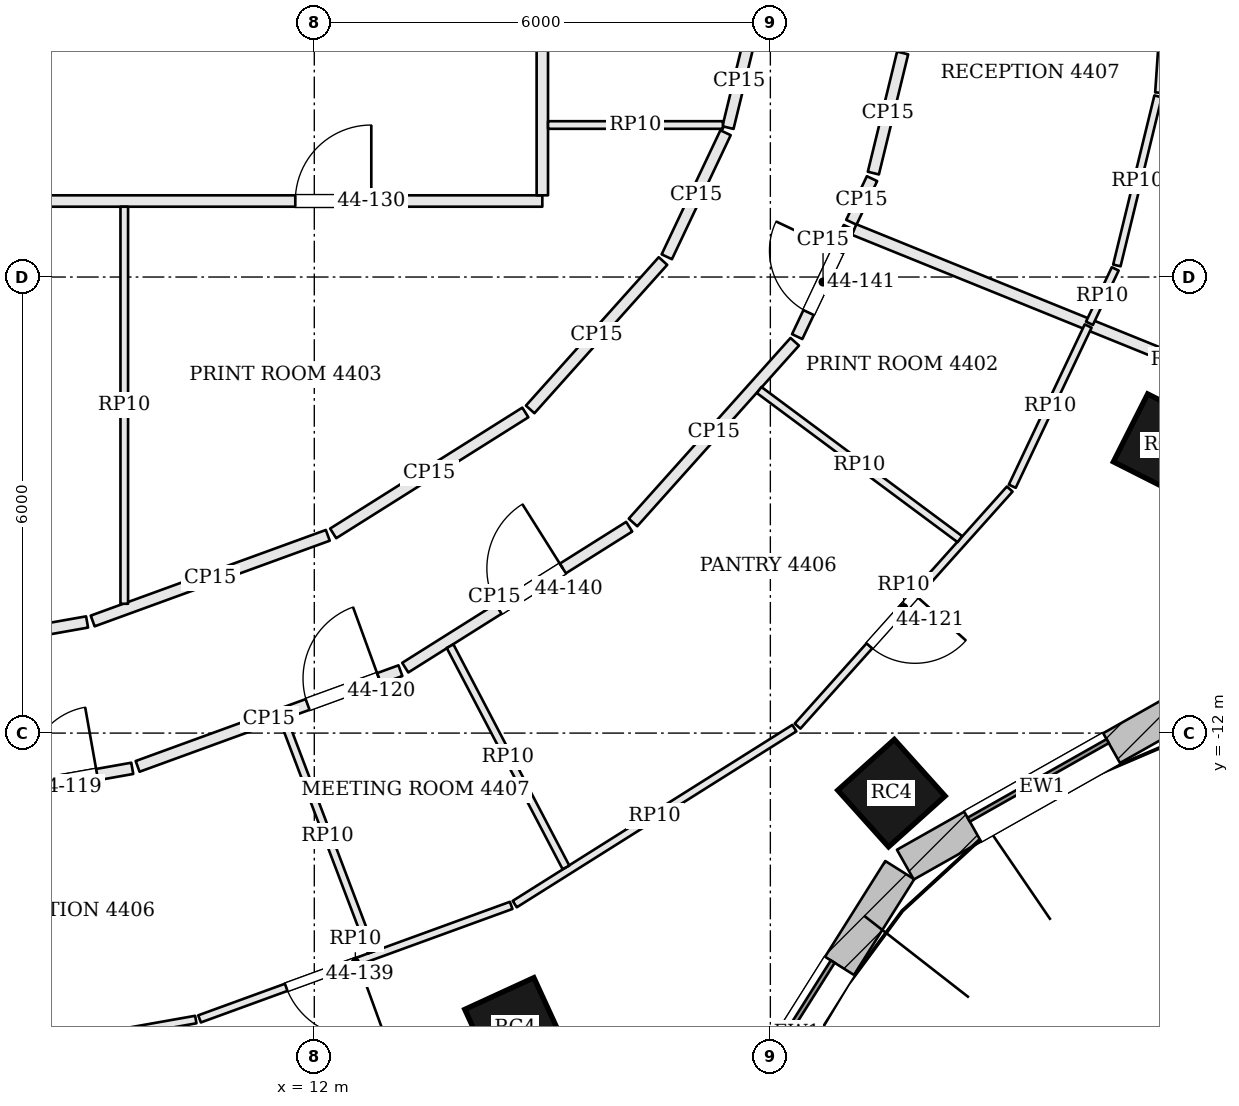
"""IFC4 building model, lengths in metres.
Left out: names, types, materials, properties, quantities, classifications, styles, units other than length and angle.
Written with IfcOpenShell. Run it as: python <this file> out.ifc"""

import sys

from ifc_helpers import new_model, si_unit, direction, frame, frame_2d, origin, origin_2d, place, context, subcontext, project, spatial, rectangle, extrude, element, fill, save


model = new_model("IFC4")
c1 = context("Model", 3, precision=1e-05, world=origin(), true_north=direction((0.0, 1.0)))
c2 = subcontext(c1, "Body", "Model", "MODEL_VIEW")
j1 = project(units=[si_unit("LENGTHUNIT", "METRE"), si_unit("PLANEANGLEUNIT", "RADIAN")], contexts=[c1])
p1 = place(None, origin())
s1 = spatial("IfcSite", under=j1, at=p1, CompositionType="ELEMENT")
p2 = place(p1, origin())
s2 = spatial("IfcBuilding", under=s1, at=p2, CompositionType="ELEMENT")
p3 = place(p2, frame((0.0, 0.0, 181.8)))
s3 = spatial("IfcBuildingStorey", under=s2, at=p3, CompositionType="ELEMENT", Elevation=181.8)
for number, where, z_axis, x_axis in (
    (1, (14.643, -15.881, 0.0), (0.0, 0.0, 1.0), (0.909, 0.417, 0.0)),
    (2, (19.593, -12.79, 0.0), (0.0, 0.0, 1.0), (0.744, 0.668, 0.0)),
    (3, (23.185, -8.21, 0.0), (0.0, 0.0, 1.0), (0.451, 0.893, 0.0)),
):
    element("IfcColumn", number, at=place(p3, frame(where, z_axis=z_axis, x_axis=x_axis)), inside=s3, PredefinedType="COLUMN", context=c2, shape_type="SweptSolid", body=[
        extrude(rectangle(XDim=1.0, YDim=1.0, at=origin_2d()), origin(), (0.0, 0.0, 1.0), 3.9),
    ])
p4 = place(p3, frame((16.998, -18.099, 0.0), z_axis=(0.0, 0.0, 1.0), x_axis=(0.532745661304, 0.846275404559, 0.0)))
e4 = element("IfcWall", 4, at=p4, inside=s3, PredefinedType="SOLIDWALL", context=c2, shape_type="SweptSolid", body=[
    extrude(rectangle(XDim=5.076, YDim=0.45, at=frame_2d((2.538, 0.0))), origin(), (0.0, 0.0, 1.0), 3.7),
])
p5 = place(p4, frame((1.488, 0.0, 0.9)))
e5 = element("IfcOpeningElement", 5, at=p5, cuts=e4, PredefinedType="OPENING", context=c2, shape_type="SweptSolid", body=[
    extrude(rectangle(XDim=2.1, YDim=2.3, at=frame_2d((1.05, 1.15))), frame((0.0, 0.235, 0.0), z_axis=(0.0, -1.0, 0.0), x_axis=(1.0, 0.0, 0.0)), (0.0, 0.0, 1.0), 0.47),
])
p6 = place(p3, frame((19.776, -13.731, 0.0), z_axis=(0.0, 0.0, 1.0), x_axis=(0.870610133829, 0.491973571318, 0.0)))
e6 = element("IfcWall", 6, at=p6, inside=s3, PredefinedType="SOLIDWALL", context=c2, shape_type="SweptSolid", body=[
    extrude(rectangle(XDim=4.134, YDim=0.45, at=frame_2d((2.067, 0.0))), origin(), (0.0, 0.0, 1.0), 3.7),
])
p7 = place(p6, frame((1.017, 0.0, 0.9)))
e7 = element("IfcOpeningElement", 7, at=p7, cuts=e6, PredefinedType="OPENING", context=c2, shape_type="SweptSolid", body=[
    extrude(rectangle(XDim=2.1, YDim=2.3, at=frame_2d((1.05, 1.15))), frame((0.0, 0.235, 0.0), z_axis=(0.0, -1.0, 0.0), x_axis=(1.0, 0.0, 0.0)), (0.0, 0.0, 1.0), 0.47),
])
p8 = place(p3, frame((5.992, -13.104, 0.0), z_axis=(0.0, 0.0, 1.0), x_axis=(0.98463249319, 0.174639209096, 0.0)))
e8 = element("IfcWall", 8, at=p8, inside=s3, PredefinedType="PARTITIONING", context=c2, shape_type="SweptSolid", body=[
    extrude(rectangle(XDim=3.67, YDim=0.15, at=frame_2d((1.835, 0.0))), origin(), (0.0, 0.0, 1.0), 3.084),
])
p9 = place(p8, frame((1.4, 0.0, 0.0)))
e9 = element("IfcOpeningElement", 9, at=p9, cuts=e8, PredefinedType="OPENING", context=c2, shape_type="SweptSolid", body=[
    extrude(rectangle(XDim=1.8, YDim=2.1, at=frame_2d((0.9, 1.05))), frame((0.0, 0.085, 0.0), z_axis=(0.0, -1.0, 0.0), x_axis=(1.0, 0.0, 0.0)), (0.0, 0.0, 1.0), 0.17),
])
p10 = place(p3, frame((9.676, -12.438, 0.0), z_axis=(0.0, 0.0, 1.0), x_axis=(0.939640289748, 0.342163887461, 0.0)))
e10 = element("IfcWall", 10, at=p10, inside=s3, PredefinedType="PARTITIONING", context=c2, shape_type="SweptSolid", body=[
    extrude(rectangle(XDim=3.68, YDim=0.15, at=frame_2d((1.84, 0.0))), origin(), (0.0, 0.0, 1.0), 3.084),
])
p11 = place(p10, frame((2.38, 0.0, 0.0)))
e11 = element("IfcOpeningElement", 11, at=p11, cuts=e10, PredefinedType="OPENING", context=c2, shape_type="SweptSolid", body=[
    extrude(rectangle(XDim=1.0, YDim=2.4, at=frame_2d((0.5, 1.2))), frame((0.0, 0.085, 0.0), z_axis=(0.0, -1.0, 0.0), x_axis=(1.0, 0.0, 0.0)), (0.0, 0.0, 1.0), 0.17),
])
p12 = place(p3, frame((13.197, -11.139, 0.0), z_axis=(0.0, 0.0, 1.0), x_axis=(0.846390903833, 0.532562144644, 0.0)))
e12 = element("IfcWall", 12, at=p12, inside=s3, PredefinedType="PARTITIONING", context=c2, shape_type="SweptSolid", body=[
    extrude(rectangle(XDim=3.481, YDim=0.15, at=frame_2d((1.741, 0.0))), origin(), (0.0, 0.0, 1.0), 3.084),
])
p13 = place(p12, frame((1.45, 0.0, 0.0)))
e13 = element("IfcOpeningElement", 13, at=p13, cuts=e12, PredefinedType="OPENING", context=c2, shape_type="SweptSolid", body=[
    extrude(rectangle(XDim=1.0, YDim=2.1, at=frame_2d((0.5, 1.05))), frame((0.0, 0.085, 0.0), z_axis=(0.0, -1.0, 0.0), x_axis=(1.0, 0.0, 0.0)), (0.0, 0.0, 1.0), 0.17),
])
p14 = place(p3, frame((16.193, -9.229, 0.0), z_axis=(0.0, 0.0, 1.0), x_axis=(0.666882089048, 0.745163256815, 0.0)))
e14 = element("IfcWall", 14, at=p14, inside=s3, PredefinedType="PARTITIONING", context=c2, shape_type="SweptSolid", body=[
    extrude(rectangle(XDim=3.19, YDim=0.15, at=frame_2d((1.595, 0.0))), origin(), (0.0, 0.0, 1.0), 3.084),
])
p15 = place(p3, frame((18.353, -6.784, 0.0), z_axis=(0.0, 0.0, 1.0), x_axis=(0.428125964575, 0.90371907054, 0.0)))
e15 = element("IfcWall", 15, at=p15, inside=s3, PredefinedType="PARTITIONING", context=c2, shape_type="SweptSolid", body=[
    extrude(rectangle(XDim=1.589, YDim=0.15, at=frame_2d((0.795, 0.0))), origin(), (0.0, 0.0, 1.0), 3.084),
])
p16 = place(p15, frame((0.35, 0.0, 0.0)))
e16 = element("IfcOpeningElement", 16, at=p16, cuts=e15, PredefinedType="OPENING", context=c2, shape_type="SweptSolid", body=[
    extrude(rectangle(XDim=0.9, YDim=2.1, at=frame_2d((0.45, 1.05))), frame((0.0, 0.085, 0.0), z_axis=(0.0, -1.0, 0.0), x_axis=(1.0, 0.0, 0.0)), (0.0, 0.0, 1.0), 0.17),
])
p17 = place(p3, frame((27.593, -8.816, 0.0), z_axis=(0.0, 0.0, 1.0), x_axis=(-0.9267854071, 0.375591279433, 0.0)))
e17 = element("IfcWall", 17, at=p17, inside=s3, PredefinedType="PARTITIONING", context=c2, shape_type="SweptSolid", body=[
    extrude(rectangle(XDim=9.161, YDim=0.15, at=frame_2d((4.58, 0.0))), origin(), (0.0, 0.0, 1.0), 3.234),
])
p18 = place(p3, frame((19.065, -5.28, 0.0), z_axis=(0.0, 0.0, 1.0), x_axis=(0.428202003813, 0.903683043954, 0.0)))
e18 = element("IfcWall", 18, at=p18, inside=s3, PredefinedType="PARTITIONING", context=c2, shape_type="SweptSolid", body=[
    extrude(rectangle(XDim=0.635, YDim=0.15, at=frame_2d((0.318, 0.0))), origin(), (0.0, 0.0, 1.0), 3.084),
])
p19 = place(p3, frame((19.355, -4.633, 0.0), z_axis=(0.0, 0.0, 1.0), x_axis=(0.236703930685, 0.971581828359, 0.0)))
e19 = element("IfcWall", 19, at=p19, inside=s3, PredefinedType="PARTITIONING", context=c2, shape_type="SweptSolid", body=[
    extrude(rectangle(XDim=1.626, YDim=0.15, at=frame_2d((0.813, 0.0))), origin(), (0.0, 0.0, 1.0), 3.084),
])
p20 = place(p3, frame((17.739, -2.818, 0.0), z_axis=(0.0, 0.0, 1.0), x_axis=(-0.236884307907, -0.971537865792, 0.0)))
e20 = element("IfcWall", 20, at=p20, inside=s3, PredefinedType="PARTITIONING", context=c2, shape_type="SweptSolid", body=[
    extrude(rectangle(XDim=1.251, YDim=0.15, at=frame_2d((0.625, 0.0))), origin(), (0.0, 0.0, 1.0), 3.084),
])
p21 = place(p3, frame((17.41, -4.102, 0.0), z_axis=(0.0, 0.0, 1.0), x_axis=(-0.428074720318, -0.903743345107, 0.0)))
e21 = element("IfcWall", 21, at=p21, inside=s3, PredefinedType="PARTITIONING", context=c2, shape_type="SweptSolid", body=[
    extrude(rectangle(XDim=1.806, YDim=0.15, at=frame_2d((0.903, 0.0))), origin(), (0.0, 0.0, 1.0), 3.084),
])
p22 = place(p3, frame((16.587, -5.789, 0.0), z_axis=(0.0, 0.0, 1.0), x_axis=(-0.666887460656, -0.745158449472, 0.0)))
e22 = element("IfcWall", 22, at=p22, inside=s3, PredefinedType="PARTITIONING", context=c2, shape_type="SweptSolid", body=[
    extrude(rectangle(XDim=2.62, YDim=0.15, at=frame_2d((1.31, 0.0))), origin(), (0.0, 0.0, 1.0), 3.084),
])
p23 = place(p3, frame((14.777, -7.781, 0.0), z_axis=(0.0, 0.0, 1.0), x_axis=(-0.846359741043, -0.532611667862, 0.0)))
e23 = element("IfcWall", 23, at=p23, inside=s3, PredefinedType="PARTITIONING", context=c2, shape_type="SweptSolid", body=[
    extrude(rectangle(XDim=2.987, YDim=0.15, at=frame_2d((1.494, 0.0))), origin(), (0.0, 0.0, 1.0), 3.084),
])
p24 = place(p3, frame((12.178, -9.398, 0.0), z_axis=(0.0, 0.0, 1.0), x_axis=(-0.939609240084, -0.342249143093, 0.0)))
e24 = element("IfcWall", 24, at=p24, inside=s3, PredefinedType="PARTITIONING", context=c2, shape_type="SweptSolid", body=[
    extrude(rectangle(XDim=3.292, YDim=0.15, at=frame_2d((1.646, 0.0))), origin(), (0.0, 0.0, 1.0), 3.084),
])
p25 = place(p3, frame((9.01, -10.538, 0.0), z_axis=(0.0, 0.0, 1.0), x_axis=(-0.984645638575, -0.174565077936, 0.0)))
e25 = element("IfcWall", 25, at=p25, inside=s3, PredefinedType="PARTITIONING", context=c2, shape_type="SweptSolid", body=[
    extrude(rectangle(XDim=4.358, YDim=0.15, at=frame_2d((2.179, 0.0))), origin(), (0.0, 0.0, 1.0), 3.084),
])
p26 = place(p3, frame((-14.925, -5.0, 0.0), z_axis=(0.0, 0.0, 1.0), x_axis=(1.0, 0.0, 0.0)))
e26 = element("IfcWall", 26, at=p26, inside=s3, PredefinedType="PARTITIONING", context=c2, shape_type="SweptSolid", body=[
    extrude(rectangle(XDim=29.925, YDim=0.15, at=frame_2d((14.962, 0.0))), origin(), (0.0, 0.0, 1.0), 3.084),
])
p27 = place(p26, frame((2.175, 0.0, 0.0)))
e27 = element("IfcOpeningElement", 27, at=p27, cuts=e26, PredefinedType="OPENING", context=c2, shape_type="SweptSolid", body=[
    extrude(rectangle(XDim=1.0, YDim=2.1, at=frame_2d((0.5, 1.05))), frame((0.0, 0.085, 0.0), z_axis=(0.0, -1.0, 0.0), x_axis=(1.0, 0.0, 0.0)), (0.0, 0.0, 1.0), 0.17),
])
p28 = place(p26, frame((14.025, 0.0, 0.0)))
e28 = element("IfcOpeningElement", 28, at=p28, cuts=e26, PredefinedType="OPENING", context=c2, shape_type="SweptSolid", body=[
    extrude(rectangle(XDim=1.8, YDim=2.1, at=frame_2d((0.9, 1.05))), frame((0.0, 0.085, 0.0), z_axis=(0.0, -1.0, 0.0), x_axis=(1.0, 0.0, 0.0)), (0.0, 0.0, 1.0), 0.17),
])
p29 = place(p26, frame((26.675, 0.0, 0.0)))
e29 = element("IfcOpeningElement", 29, at=p29, cuts=e26, PredefinedType="OPENING", context=c2, shape_type="SweptSolid", body=[
    extrude(rectangle(XDim=1.0, YDim=2.1, at=frame_2d((0.5, 1.05))), frame((0.0, 0.085, 0.0), z_axis=(0.0, -1.0, 0.0), x_axis=(1.0, 0.0, 0.0)), (0.0, 0.0, 1.0), 0.17),
])
p30 = place(p3, frame((15.0, -4.925, 0.0), z_axis=(0.0, 0.0, 1.0), x_axis=(0.0, 1.0, 0.0)))
e30 = element("IfcWall", 30, at=p30, inside=s3, PredefinedType="PARTITIONING", context=c2, shape_type="SweptSolid", body=[
    extrude(rectangle(XDim=12.583, YDim=0.15, at=frame_2d((6.292, 0.0))), origin(), (0.0, 0.0, 1.0), 3.084),
])
p31 = place(p30, frame((6.441, 0.0, 0.0)))
e31 = element("IfcOpeningElement", 31, at=p31, cuts=e30, PredefinedType="OPENING", context=c2, shape_type="SweptSolid", body=[
    extrude(rectangle(XDim=0.7, YDim=2.1, at=frame_2d((0.35, 1.05))), frame((0.0, 0.085, 0.0), z_axis=(0.0, -1.0, 0.0), x_axis=(1.0, 0.0, 0.0)), (0.0, 0.0, 1.0), 0.17),
])
p32 = place(p3, frame((22.181, -6.645, 0.0), z_axis=(0.0, 0.0, 1.0), x_axis=(-0.428144841987, -0.903710127353, 0.0)))
e32 = element("IfcWall", 32, at=p32, inside=s3, PredefinedType="PARTITIONING", context=c2, shape_type="SweptSolid", body=[
    extrude(rectangle(XDim=2.332, YDim=0.1, at=frame_2d((1.166, 0.0))), origin(), (0.0, 0.0, 1.0), 3.084),
])
p33 = place(p3, frame((21.149, -8.789, 0.0), z_axis=(0.0, 0.0, 1.0), x_axis=(-0.666915902537, -0.745132994132, 0.0)))
e33 = element("IfcWall", 33, at=p33, inside=s3, PredefinedType="PARTITIONING", context=c2, shape_type="SweptSolid", body=[
    extrude(rectangle(XDim=4.186, YDim=0.1, at=frame_2d((2.093, 0.0))), origin(), (0.0, 0.0, 1.0), 3.084),
])
p34 = place(p33, frame((1.869, 0.0, 0.0)))
e34 = element("IfcOpeningElement", 34, at=p34, cuts=e33, PredefinedType="OPENING", context=c2, shape_type="SweptSolid", body=[
    extrude(rectangle(XDim=0.9, YDim=2.1, at=frame_2d((0.45, 1.05))), frame((0.0, 0.06, 0.0), z_axis=(0.0, -1.0, 0.0), x_axis=(1.0, 0.0, 0.0)), (0.0, 0.0, 1.0), 0.12),
])
p35 = place(p3, frame((18.316, -11.935, 0.0), z_axis=(0.0, 0.0, 1.0), x_axis=(-0.84637539713, -0.532586788358, 0.0)))
e35 = element("IfcWall", 35, at=p35, inside=s3, PredefinedType="PARTITIONING", context=c2, shape_type="SweptSolid", body=[
    extrude(rectangle(XDim=4.346, YDim=0.1, at=frame_2d((2.173, 0.0))), origin(), (0.0, 0.0, 1.0), 3.084),
])
p36 = place(p3, frame((14.59, -14.267, 0.0), z_axis=(0.0, 0.0, 1.0), x_axis=(-0.939623405418, -0.342210251148, 0.0)))
e36 = element("IfcWall", 36, at=p36, inside=s3, PredefinedType="PARTITIONING", context=c2, shape_type="SweptSolid", body=[
    extrude(rectangle(XDim=4.363, YDim=0.1, at=frame_2d((2.182, 0.0))), origin(), (0.0, 0.0, 1.0), 3.084),
])
p37 = place(p36, frame((2.15, 0.0, 0.0)))
e37 = element("IfcOpeningElement", 37, at=p37, cuts=e36, PredefinedType="OPENING", context=c2, shape_type="SweptSolid", body=[
    extrude(rectangle(XDim=1.0, YDim=2.1, at=frame_2d((0.5, 1.05))), frame((0.0, 0.06, 0.0), z_axis=(0.0, -1.0, 0.0), x_axis=(1.0, 0.0, 0.0)), (0.0, 0.0, 1.0), 0.12),
])
p38 = place(p3, frame((10.441, -15.769, 0.0), z_axis=(0.0, 0.0, 1.0), x_axis=(-0.984637220861, -0.174612551941, 0.0)))
e38 = element("IfcWall", 38, at=p38, inside=s3, PredefinedType="PARTITIONING", context=c2, shape_type="SweptSolid", body=[
    extrude(rectangle(XDim=4.125, YDim=0.1, at=frame_2d((2.062, 0.0))), origin(), (0.0, 0.0, 1.0), 3.084),
])
p39 = place(p3, frame((11.594, -11.819, 0.0), z_axis=(0.0, 0.0, 1.0), x_axis=(0.354584575087, -0.935023945742, 0.0)))
e39 = element("IfcWall", 39, at=p39, inside=s3, PredefinedType="PARTITIONING", context=c2, shape_type="SweptSolid", body=[
    extrude(rectangle(XDim=3.275, YDim=0.1, at=frame_2d((1.638, 0.0))), origin(), (0.0, 0.0, 1.0), 3.084),
])
p40 = place(p3, frame((13.786, -10.856, 0.0), z_axis=(0.0, 0.0, 1.0), x_axis=(0.464015323866, -0.885827172318, 0.0)))
e40 = element("IfcWall", 40, at=p40, inside=s3, PredefinedType="PARTITIONING", context=c2, shape_type="SweptSolid", body=[
    extrude(rectangle(XDim=3.286, YDim=0.1, at=frame_2d((1.643, 0.0))), origin(), (0.0, 0.0, 1.0), 3.084),
])
p41 = place(p3, frame((17.853, -7.487, 0.0), z_axis=(0.0, 0.0, 1.0), x_axis=(0.802681916891, -0.596407361034, 0.0)))
e41 = element("IfcWall", 41, at=p41, inside=s3, PredefinedType="PARTITIONING", context=c2, shape_type="SweptSolid", body=[
    extrude(rectangle(XDim=3.289, YDim=0.1, at=frame_2d((1.645, 0.0))), origin(), (0.0, 0.0, 1.0), 3.084),
])
p42 = place(p3, frame((23.354, -0.05, 0.0), z_axis=(0.0, 0.0, 1.0), x_axis=(-0.06820679361, -0.99767120501, 0.0)))
e42 = element("IfcWall", 42, at=p42, inside=s3, PredefinedType="PARTITIONING", context=c2, shape_type="SweptSolid", body=[
    extrude(rectangle(XDim=3.533, YDim=0.1, at=frame_2d((1.767, 0.0))), origin(), (0.0, 0.0, 1.0), 3.084),
])
p43 = place(p3, frame((23.101, -3.623, 0.0), z_axis=(0.0, 0.0, 1.0), x_axis=(-0.236811358433, -0.971555649727, 0.0)))
e43 = element("IfcWall", 43, at=p43, inside=s3, PredefinedType="PARTITIONING", context=c2, shape_type="SweptSolid", body=[
    extrude(rectangle(XDim=2.29, YDim=0.1, at=frame_2d((1.145, 0.0))), origin(), (0.0, 0.0, 1.0), 3.084),
])
p44 = place(p3, frame((22.537, -5.893, 0.0), z_axis=(0.0, 0.0, 1.0), x_axis=(-0.427993557618, -0.903781784856, 0.0)))
e44 = element("IfcWall", 44, at=p44, inside=s3, PredefinedType="PARTITIONING", context=c2, shape_type="SweptSolid", body=[
    extrude(rectangle(XDim=0.792, YDim=0.1, at=frame_2d((0.396, 0.0))), origin(), (0.0, 0.0, 1.0), 3.084),
])
p45 = place(p3, frame((9.5, -10.299, 0.0), z_axis=(0.0, 0.0, 1.0), x_axis=(0.0, 1.0, 0.0)))
e45 = element("IfcWall", 45, at=p45, inside=s3, PredefinedType="PARTITIONING", context=c2, shape_type="SweptSolid", body=[
    extrude(rectangle(XDim=5.224, YDim=0.1, at=frame_2d((2.612, 0.0))), origin(), (0.0, 0.0, 1.0), 3.084),
])
p46 = place(p3, frame((15.075, -4.0, 0.0), z_axis=(0.0, 0.0, 1.0), x_axis=(1.0, 0.0, 0.0)))
e46 = element("IfcWall", 46, at=p46, inside=s3, PredefinedType="PARTITIONING", context=c2, shape_type="SweptSolid", body=[
    extrude(rectangle(XDim=2.301, YDim=0.1, at=frame_2d((1.15, 0.0))), origin(), (0.0, 0.0, 1.0), 3.084),
])
p47 = place(p5, origin())
e47 = element("IfcWindow", 47, at=p47, inside=s3, PartitioningType="SINGLE_PANEL", PredefinedType="WINDOW", context=c2, shape_type="SweptSolid", body=[
    extrude(rectangle(XDim=2.1, YDim=2.3, at=frame_2d((1.05, 1.15))), frame((0.0, 0.135, 0.0), z_axis=(0.0, -1.0, 0.0), x_axis=(1.0, 0.0, 0.0)), (0.0, 0.0, 1.0), 0.06),
])
fill(e5, e47)
p48 = place(p7, origin())
e48 = element("IfcWindow", 48, at=p48, inside=s3, PartitioningType="SINGLE_PANEL", PredefinedType="WINDOW", context=c2, shape_type="SweptSolid", body=[
    extrude(rectangle(XDim=2.1, YDim=2.3, at=frame_2d((1.05, 1.15))), frame((0.0, 0.135, 0.0), z_axis=(0.0, -1.0, 0.0), x_axis=(1.0, 0.0, 0.0)), (0.0, 0.0, 1.0), 0.06),
])
fill(e7, e48)
p49 = place(p9, origin())
e49 = element("IfcDoor", 49, at=p49, inside=s3, OperationType="DOUBLE_DOOR_SINGLE_SWING", PredefinedType="DOOR", context=c2, shape_type="SweptSolid", body=[
    extrude(rectangle(XDim=1.8, YDim=2.1, at=frame_2d((0.9, 1.05))), frame((0.0, 0.025, 0.0), z_axis=(0.0, -1.0, 0.0), x_axis=(1.0, 0.0, 0.0)), (0.0, 0.0, 1.0), 0.05),
])
fill(e9, e49)
p50 = place(p11, origin())
e50 = element("IfcDoor", 50, at=p50, inside=s3, OperationType="SINGLE_SWING_RIGHT", PredefinedType="DOOR", context=c2, shape_type="SweptSolid", body=[
    extrude(rectangle(XDim=1.0, YDim=2.4, at=frame_2d((0.5, 1.2))), frame((0.0, 0.025, 0.0), z_axis=(0.0, -1.0, 0.0), x_axis=(1.0, 0.0, 0.0)), (0.0, 0.0, 1.0), 0.05),
])
fill(e11, e50)
p51 = place(p34, origin())
e51 = element("IfcDoor", 51, at=p51, inside=s3, OperationType="SINGLE_SWING_LEFT", PredefinedType="DOOR", context=c2, shape_type="SweptSolid", body=[
    extrude(rectangle(XDim=0.9, YDim=2.1, at=frame_2d((0.45, 1.05))), frame((0.0, 0.025, 0.0), z_axis=(0.0, -1.0, 0.0), x_axis=(1.0, 0.0, 0.0)), (0.0, 0.0, 1.0), 0.05),
])
fill(e34, e51)
p52 = place(p29, origin())
e52 = element("IfcDoor", 52, at=p52, inside=s3, OperationType="SINGLE_SWING_RIGHT", PredefinedType="DOOR", context=c2, shape_type="SweptSolid", body=[
    extrude(rectangle(XDim=1.0, YDim=2.1, at=frame_2d((0.5, 1.05))), frame((0.0, 0.025, 0.0), z_axis=(0.0, -1.0, 0.0), x_axis=(1.0, 0.0, 0.0)), (0.0, 0.0, 1.0), 0.05),
])
fill(e29, e52)
p53 = place(p37, origin())
e53 = element("IfcDoor", 53, at=p53, inside=s3, OperationType="SINGLE_SWING_LEFT", PredefinedType="DOOR", context=c2, shape_type="SweptSolid", body=[
    extrude(rectangle(XDim=1.0, YDim=2.1, at=frame_2d((0.5, 1.05))), frame((0.0, 0.025, 0.0), z_axis=(0.0, -1.0, 0.0), x_axis=(1.0, 0.0, 0.0)), (0.0, 0.0, 1.0), 0.05),
])
fill(e37, e53)
p54 = place(p13, origin())
e54 = element("IfcDoor", 54, at=p54, inside=s3, OperationType="SINGLE_SWING_RIGHT", PredefinedType="DOOR", context=c2, shape_type="SweptSolid", body=[
    extrude(rectangle(XDim=1.0, YDim=2.1, at=frame_2d((0.5, 1.05))), frame((0.0, 0.025, 0.0), z_axis=(0.0, -1.0, 0.0), x_axis=(1.0, 0.0, 0.0)), (0.0, 0.0, 1.0), 0.05),
])
fill(e13, e54)
p55 = place(p16, origin())
e55 = element("IfcDoor", 55, at=p55, inside=s3, OperationType="SINGLE_SWING_RIGHT", PredefinedType="DOOR", context=c2, shape_type="SweptSolid", body=[
    extrude(rectangle(XDim=0.9, YDim=2.1, at=frame_2d((0.45, 1.05))), frame((0.0, 0.025, 0.0), z_axis=(0.0, -1.0, 0.0), x_axis=(1.0, 0.0, 0.0)), (0.0, 0.0, 1.0), 0.05),
])
fill(e16, e55)
save(model, sys.argv[1])
